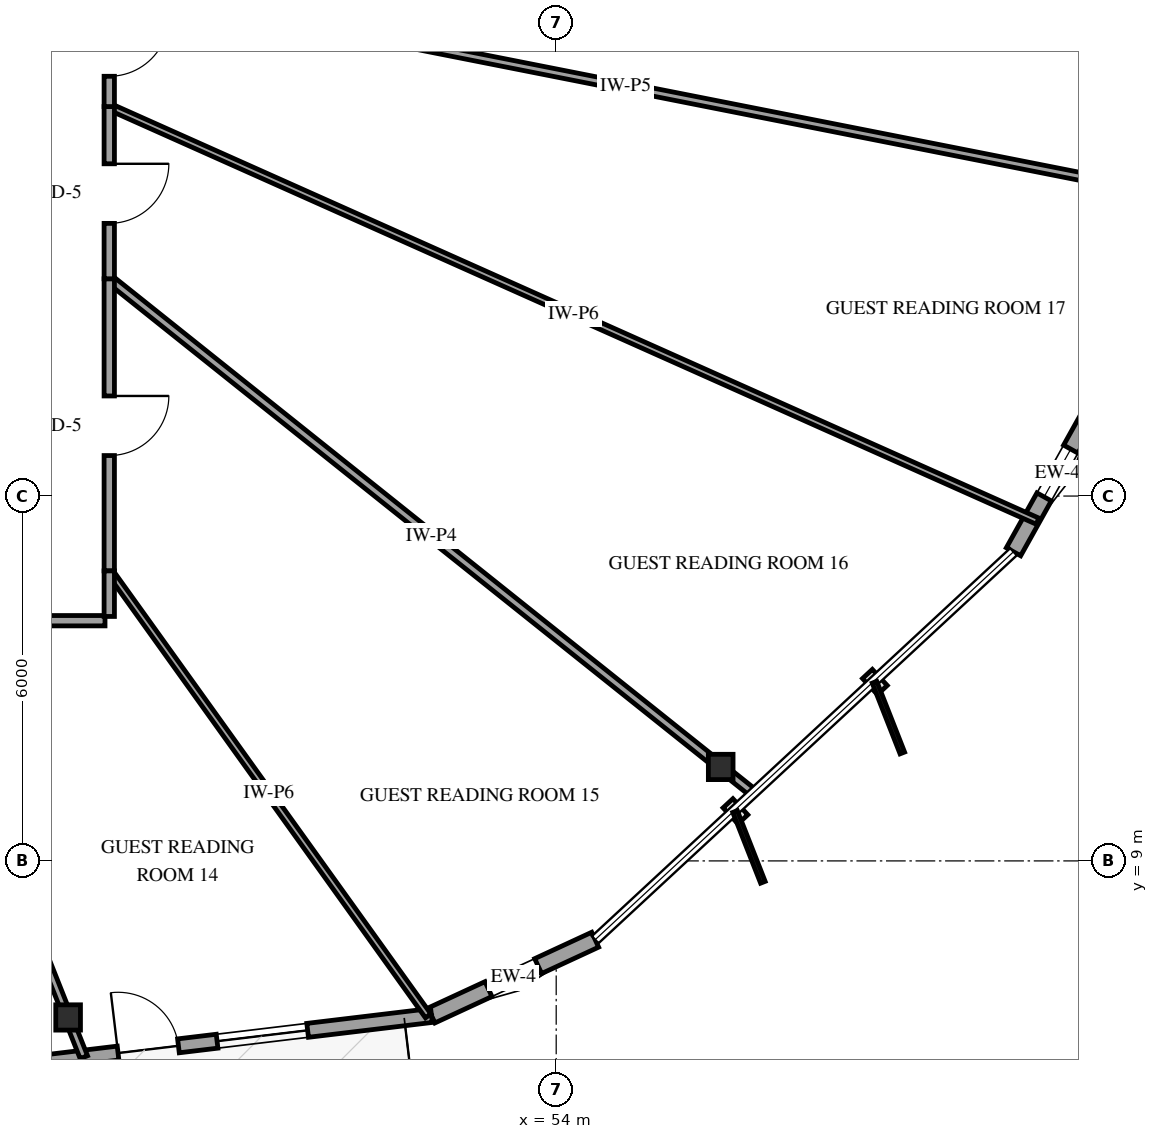
"""IFC4 building model, lengths in metres.
Left out: names, types, materials, properties, quantities, classifications, styles, units other than length and angle.
Written with IfcOpenShell. Run it as: python <this file> out.ifc"""

import sys

from ifc_helpers import new_model, si_unit, direction, frame, frame_2d, origin, origin_2d, place, context, subcontext, project, spatial, rectangle, i_section, extrude, element, fill, save


model = new_model("IFC4")
c1 = context("Model", 3, precision=1e-05, world=origin(), true_north=direction((0.0, 1.0)))
c2 = subcontext(c1, "Body", "Model", "MODEL_VIEW")
j1 = project(units=[si_unit("LENGTHUNIT", "METRE"), si_unit("PLANEANGLEUNIT", "RADIAN")], contexts=[c1])
p1 = place(None, origin())
s1 = spatial("IfcSite", under=j1, at=p1, CompositionType="ELEMENT")
p2 = place(p1, origin())
s2 = spatial("IfcBuilding", under=s1, at=p2, CompositionType="ELEMENT")
p3 = place(p2, frame((0.0, 0.0, 190.6)))
s3 = spatial("IfcBuildingStorey", under=s2, at=p3, CompositionType="ELEMENT", Elevation=190.6)
for number, where, z_axis, x_axis in (
    (1, (45.973, 6.426, -0.3), (0.0, 0.0, 1.0), (1.0, 0.0, 0.0)),
    (2, (56.705, 10.545, -0.3), (0.0, 0.0, 1.0), (1.0, 0.0, 0.0)),
):
    element("IfcColumn", number, at=place(p3, frame(where, z_axis=z_axis, x_axis=x_axis)), inside=s3, PredefinedType="COLUMN", context=c2, shape_type="SweptSolid", body=[
        extrude(i_section(OverallWidth=0.406, OverallDepth=0.416, WebThickness=0.03, FlangeThickness=0.048, FilletRadius=0.038, at=origin_2d()), origin(), (0.0, 0.0, 1.0), 3.9),
    ])
p4 = place(p3, frame((51.949, 6.458, 0.0), z_axis=(0.0, 0.0, 1.0), x_axis=(0.907501185291, 0.420049519337, 0.0)))
e3 = element("IfcWall", 3, at=p4, inside=s3, PredefinedType="SOLIDWALL", context=c2, shape_type="SweptSolid", body=[
    extrude(rectangle(XDim=2.967, YDim=0.27, at=frame_2d((1.483, 0.0))), origin(), (0.0, 0.0, 1.0), 2.679),
])
p5 = place(p4, frame((1.033, 0.0, 0.75)))
e4 = element("IfcOpeningElement", 4, at=p5, cuts=e3, PredefinedType="OPENING", context=c2, shape_type="SweptSolid", body=[
    extrude(rectangle(XDim=0.9, YDim=1.5, at=frame_2d((0.45, 0.75))), frame((0.0, 0.145, 0.0), z_axis=(0.0, -1.0, 0.0), x_axis=(1.0, 0.0, 0.0)), (0.0, 0.0, 1.0), 0.29),
])
p6 = place(p3, frame((42.634, 5.341, 0.0), z_axis=(0.0, 0.0, 1.0), x_axis=(0.992882132133, 0.119101098615, 0.0)))
e5 = element("IfcWall", 5, at=p6, inside=s3, PredefinedType="SOLIDWALL", context=c2, shape_type="SweptSolid", body=[
    extrude(rectangle(XDim=9.382, YDim=0.23, at=frame_2d((4.691, 0.0))), origin(), (0.0, 0.0, 1.0), 2.679),
])
p7 = place(p6, frame((4.191, 0.0, 0.0)))
e6 = element("IfcOpeningElement", 6, at=p7, cuts=e5, PredefinedType="OPENING", context=c2, shape_type="SweptSolid", body=[
    extrude(rectangle(XDim=1.0, YDim=2.15, at=frame_2d((0.5, 1.075))), frame((0.0, 0.125, 0.0), z_axis=(0.0, -1.0, 0.0), x_axis=(1.0, 0.0, 0.0)), (0.0, 0.0, 1.0), 0.25),
])
p8 = place(p6, frame((0.977, 0.0, 0.72)))
e7 = element("IfcOpeningElement", 7, at=p8, cuts=e5, PredefinedType="OPENING", context=c2, shape_type="SweptSolid", body=[
    extrude(rectangle(XDim=1.5, YDim=1.7, at=frame_2d((0.75, 0.85))), frame((0.0, 0.125, 0.0), z_axis=(0.0, -1.0, 0.0), x_axis=(1.0, 0.0, 0.0)), (0.0, 0.0, 1.0), 0.25),
])
p9 = place(p6, frame((5.831, 0.0, 0.72)))
e8 = element("IfcOpeningElement", 8, at=p9, cuts=e5, PredefinedType="OPENING", context=c2, shape_type="SweptSolid", body=[
    extrude(rectangle(XDim=1.5, YDim=1.7, at=frame_2d((0.75, 0.85))), frame((0.0, 0.125, 0.0), z_axis=(0.0, -1.0, 0.0), x_axis=(1.0, 0.0, 0.0)), (0.0, 0.0, 1.0), 0.25),
])
p10 = place(p3, frame((61.521, 14.083, 0.0), z_axis=(0.0, 0.0, 1.0), x_axis=(0.48724212473, 0.87326691904, 0.0)))
e9 = element("IfcWall", 9, at=p10, inside=s3, PredefinedType="SOLIDWALL", context=c2, shape_type="SweptSolid", body=[
    extrude(rectangle(XDim=2.967, YDim=0.27, at=frame_2d((1.483, 0.0))), origin(), (0.0, 0.0, 1.0), 2.679),
])
p11 = place(p10, frame((1.033, 0.0, 0.75)))
e10 = element("IfcOpeningElement", 10, at=p11, cuts=e9, PredefinedType="OPENING", context=c2, shape_type="SweptSolid", body=[
    extrude(rectangle(XDim=0.9, YDim=1.5, at=frame_2d((0.45, 0.75))), frame((0.0, 0.145, 0.0), z_axis=(0.0, -1.0, 0.0), x_axis=(1.0, 0.0, 0.0)), (0.0, 0.0, 1.0), 0.29),
])
p12 = place(p3, frame((46.65, 23.41, 0.0), z_axis=(0.0, 0.0, 1.0), x_axis=(0.981040630624, -0.193802169918, 0.0)))
e11 = element("IfcWall", 11, at=p12, inside=s3, PredefinedType="PARTITIONING", context=c2, shape_type="SweptSolid", body=[
    extrude(rectangle(XDim=17.311, YDim=0.13, at=frame_2d((8.656, 0.0))), origin(), (0.0, 0.0, 1.0), 2.595),
])
p13 = place(p3, frame((46.65, 21.405, 0.0), z_axis=(0.0, 0.0, 1.0), x_axis=(0.913073615339, -0.4077947682, 0.0)))
e12 = element("IfcWall", 12, at=p13, inside=s3, PredefinedType="PARTITIONING", context=c2, shape_type="SweptSolid", body=[
    extrude(rectangle(XDim=16.719, YDim=0.11, at=frame_2d((8.36, 0.0))), origin(), (0.0, 0.0, 1.0), 3.3),
])
p14 = place(p3, frame((46.65, 18.573, 0.0), z_axis=(0.0, 0.0, 1.0), x_axis=(0.781465935212, -0.623947908165, 0.0)))
e13 = element("IfcWall", 13, at=p14, inside=s3, PredefinedType="PARTITIONING", context=c2, shape_type="SweptSolid", body=[
    extrude(rectangle(XDim=13.554, YDim=0.14, at=frame_2d((6.777, 0.0))), origin(), (0.0, 0.0, 1.0), 3.3),
])
p15 = place(p3, frame((46.65, 13.769, 0.0), z_axis=(0.0, 0.0, 1.0), x_axis=(0.582553277152, -0.812792519207, 0.0)))
e14 = element("IfcWall", 14, at=p15, inside=s3, PredefinedType="PARTITIONING", context=c2, shape_type="SweptSolid", body=[
    extrude(rectangle(XDim=9.004, YDim=0.11, at=frame_2d((4.502, 0.0))), origin(), (0.0, 0.0, 1.0), 2.678),
])
p16 = place(p3, frame((43.383, 12.95, 0.0), z_axis=(0.0, 0.0, 1.0), x_axis=(0.3688984108, -0.929469721136, 0.0)))
e15 = element("IfcWall", 15, at=p16, inside=s3, PredefinedType="PARTITIONING", context=c2, shape_type="SweptSolid", body=[
    extrude(rectangle(XDim=7.723, YDim=0.13, at=frame_2d((3.861, 0.0))), origin(), (0.0, 0.0, 1.0), 2.595),
])
p17 = place(p16, frame((3.436, 0.0, 0.0)))
e16 = element("IfcOpeningElement", 16, at=p17, cuts=e15, PredefinedType="OPENING", context=c2, shape_type="SweptSolid", body=[
    extrude(rectangle(XDim=0.85, YDim=2.1, at=frame_2d((0.425, 1.05))), frame((0.0, 0.075, 0.0), z_axis=(0.0, -1.0, 0.0), x_axis=(1.0, 0.0, 0.0)), (0.0, 0.0, 1.0), 0.15),
])
p18 = place(p3, frame((46.65, 18.573, 0.0), z_axis=(0.0, 0.0, 1.0), x_axis=(0.0, -1.0, 0.0)))
e17 = element("IfcWall", 17, at=p18, inside=s3, PredefinedType="PARTITIONING", context=c2, shape_type="SweptSolid", body=[
    extrude(rectangle(XDim=4.804, YDim=0.17, at=frame_2d((2.402, 0.0))), origin(), (0.0, 0.0, 1.0), 3.3),
])
p19 = place(p18, frame((1.927, 0.0, 0.0)))
e18 = element("IfcOpeningElement", 18, at=p19, cuts=e17, PredefinedType="OPENING", context=c2, shape_type="SweptSolid", body=[
    extrude(rectangle(XDim=0.98, YDim=2.15, at=frame_2d((0.49, 1.075))), frame((0.0, 0.095, 0.0), z_axis=(0.0, -1.0, 0.0), x_axis=(1.0, 0.0, 0.0)), (0.0, 0.0, 1.0), 0.19),
])
p20 = place(p3, frame((46.58, 12.95, 0.0), z_axis=(0.0, 0.0, 1.0), x_axis=(-1.0, 0.0, 0.0)))
e19 = element("IfcWall", 19, at=p20, inside=s3, PredefinedType="PARTITIONING", context=c2, shape_type="SweptSolid", body=[
    extrude(rectangle(XDim=3.197, YDim=0.17, at=frame_2d((1.599, 0.0))), origin(), (0.0, 0.0, 1.0), 3.3),
])
p21 = place(p20, frame((1.123, 0.0, 0.0)))
e20 = element("IfcOpeningElement", 20, at=p21, cuts=e19, PredefinedType="OPENING", context=c2, shape_type="SweptSolid", body=[
    extrude(rectangle(XDim=0.98, YDim=2.15, at=frame_2d((0.49, 1.075))), frame((0.0, 0.095, 0.0), z_axis=(0.0, -1.0, 0.0), x_axis=(1.0, 0.0, 0.0)), (0.0, 0.0, 1.0), 0.19),
])
p22 = place(p3, frame((46.65, 21.405, 0.0), z_axis=(0.0, 0.0, 1.0), x_axis=(0.0, -1.0, 0.0)))
e21 = element("IfcWall", 21, at=p22, inside=s3, PredefinedType="PARTITIONING", context=c2, shape_type="SweptSolid", body=[
    extrude(rectangle(XDim=2.832, YDim=0.17, at=frame_2d((1.416, 0.0))), origin(), (0.0, 0.0, 1.0), 3.3),
])
p23 = place(p22, frame((0.941, 0.0, 0.0)))
e22 = element("IfcOpeningElement", 22, at=p23, cuts=e21, PredefinedType="OPENING", context=c2, shape_type="SweptSolid", body=[
    extrude(rectangle(XDim=0.98, YDim=2.15, at=frame_2d((0.49, 1.075))), frame((0.0, 0.095, 0.0), z_axis=(0.0, -1.0, 0.0), x_axis=(1.0, 0.0, 0.0)), (0.0, 0.0, 1.0), 0.19),
])
p24 = place(p3, frame((46.65, 23.41, 0.0), z_axis=(0.0, 0.0, 1.0), x_axis=(0.0, -1.0, 0.0)))
e23 = element("IfcWall", 23, at=p24, inside=s3, PredefinedType="PARTITIONING", context=c2, shape_type="SweptSolid", body=[
    extrude(rectangle(XDim=2.005, YDim=0.17, at=frame_2d((1.002, 0.0))), origin(), (0.0, 0.0, 1.0), 3.3),
])
p25 = place(p24, frame((0.527, 0.0, 0.0)))
e24 = element("IfcOpeningElement", 24, at=p25, cuts=e23, PredefinedType="OPENING", context=c2, shape_type="SweptSolid", body=[
    extrude(rectangle(XDim=0.98, YDim=2.15, at=frame_2d((0.49, 1.075))), frame((0.0, 0.095, 0.0), z_axis=(0.0, -1.0, 0.0), x_axis=(1.0, 0.0, 0.0)), (0.0, 0.0, 1.0), 0.19),
])
p26 = place(p3, frame((46.65, 13.769, 0.0), z_axis=(0.0, 0.0, 1.0), x_axis=(0.0, -1.0, 0.0)))
e25 = element("IfcWall", 25, at=p26, inside=s3, PredefinedType="PARTITIONING", context=c2, shape_type="SweptSolid", body=[
    extrude(rectangle(XDim=0.749, YDim=0.17, at=frame_2d((0.375, 0.0))), origin(), (0.0, 0.0, 1.0), 3.3),
])
p27 = place(p5, origin())
e26 = element("IfcWindow", 26, at=p27, inside=s3, PartitioningType="SINGLE_PANEL", PredefinedType="WINDOW", context=c2, shape_type="SweptSolid", body=[
    extrude(rectangle(XDim=0.9, YDim=1.5, at=frame_2d((0.45, 0.75))), frame((0.0, 0.03, 0.0), z_axis=(0.0, -1.0, 0.0), x_axis=(1.0, 0.0, 0.0)), (0.0, 0.0, 1.0), 0.06),
])
fill(e4, e26)
p28 = place(p7, origin())
e27 = element("IfcDoor", 27, at=p28, inside=s3, OperationType="SINGLE_SWING_LEFT", PredefinedType="DOOR", context=c2, shape_type="SweptSolid", body=[
    extrude(rectangle(XDim=1.0, YDim=2.15, at=frame_2d((0.5, 1.075))), frame((0.0, 0.025, 0.0), z_axis=(0.0, -1.0, 0.0), x_axis=(1.0, 0.0, 0.0)), (0.0, 0.0, 1.0), 0.05),
])
fill(e6, e27)
p29 = place(p9, origin())
e28 = element("IfcWindow", 28, at=p29, inside=s3, PartitioningType="SINGLE_PANEL", PredefinedType="WINDOW", context=c2, shape_type="SweptSolid", body=[
    extrude(rectangle(XDim=1.5, YDim=1.7, at=frame_2d((0.75, 0.85))), frame((0.0, 0.03, 0.0), z_axis=(0.0, -1.0, 0.0), x_axis=(1.0, 0.0, 0.0)), (0.0, 0.0, 1.0), 0.06),
])
fill(e8, e28)
p30 = place(p11, origin())
e29 = element("IfcWindow", 29, at=p30, inside=s3, PartitioningType="SINGLE_PANEL", PredefinedType="WINDOW", context=c2, shape_type="SweptSolid", body=[
    extrude(rectangle(XDim=0.9, YDim=1.5, at=frame_2d((0.45, 0.75))), frame((0.0, 0.03, 0.0), z_axis=(0.0, -1.0, 0.0), x_axis=(1.0, 0.0, 0.0)), (0.0, 0.0, 1.0), 0.06),
])
fill(e10, e29)
p31 = place(p19, origin())
e30 = element("IfcDoor", 30, at=p31, inside=s3, OperationType="SINGLE_SWING_LEFT", PredefinedType="DOOR", context=c2, shape_type="SweptSolid", body=[
    extrude(rectangle(XDim=0.98, YDim=2.15, at=frame_2d((0.49, 1.075))), frame((0.0, 0.025, 0.0), z_axis=(0.0, -1.0, 0.0), x_axis=(1.0, 0.0, 0.0)), (0.0, 0.0, 1.0), 0.05),
])
fill(e18, e30)
p32 = place(p23, origin())
e31 = element("IfcDoor", 31, at=p32, inside=s3, OperationType="SINGLE_SWING_LEFT", PredefinedType="DOOR", context=c2, shape_type="SweptSolid", body=[
    extrude(rectangle(XDim=0.98, YDim=2.15, at=frame_2d((0.49, 1.075))), frame((0.0, 0.025, 0.0), z_axis=(0.0, -1.0, 0.0), x_axis=(1.0, 0.0, 0.0)), (0.0, 0.0, 1.0), 0.05),
])
fill(e22, e31)
p33 = place(p25, origin())
e32 = element("IfcDoor", 32, at=p33, inside=s3, OperationType="SINGLE_SWING_LEFT", PredefinedType="DOOR", context=c2, shape_type="SweptSolid", body=[
    extrude(rectangle(XDim=0.98, YDim=2.15, at=frame_2d((0.49, 1.075))), frame((0.0, 0.025, 0.0), z_axis=(0.0, -1.0, 0.0), x_axis=(1.0, 0.0, 0.0)), (0.0, 0.0, 1.0), 0.05),
])
fill(e24, e32)
save(model, sys.argv[1])
